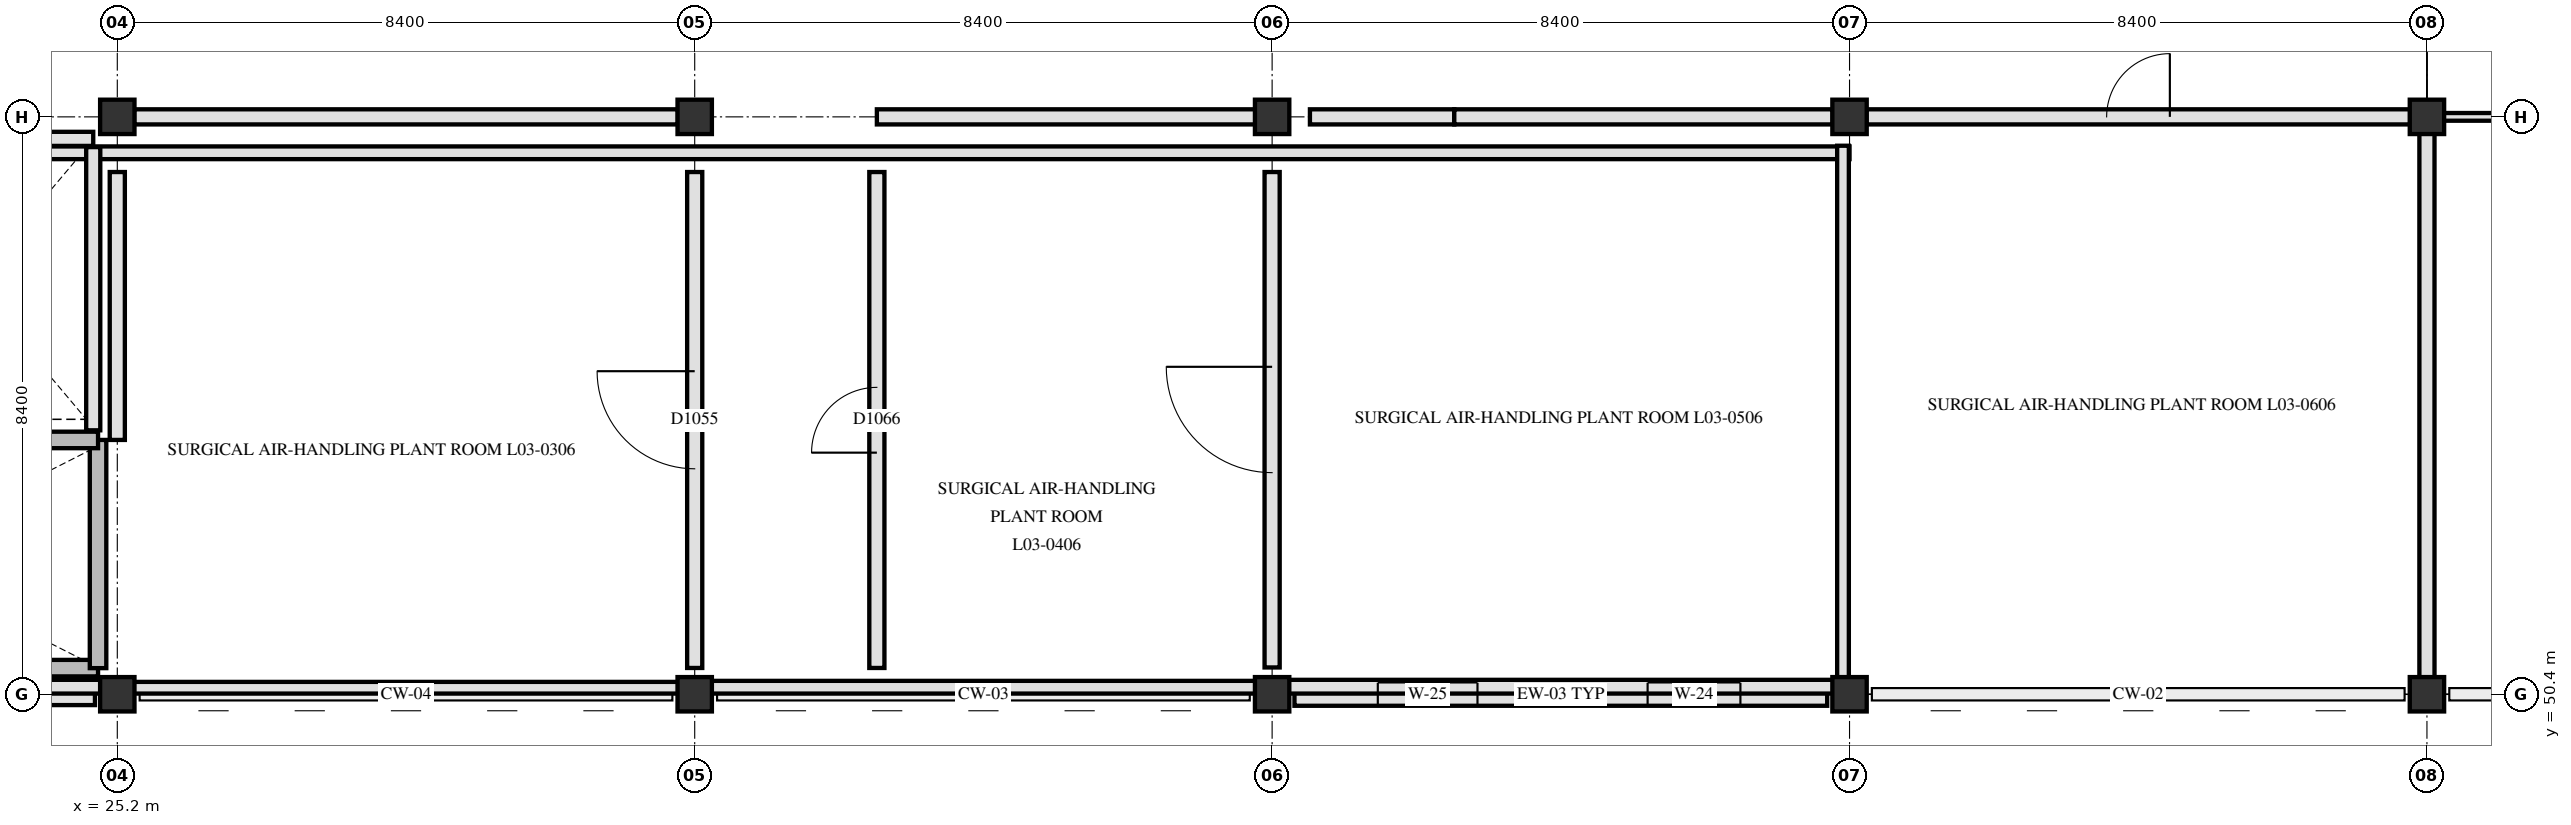
"""IFC4 building model, lengths in metres.
Left out: names, types, materials, properties, quantities, classifications, styles, units other than length and angle.
Written with IfcOpenShell. Run it as: python <this file> out.ifc"""

import sys

from ifc_helpers import new_model, si_unit, direction, frame, frame_2d, origin, origin_2d, place, context, subcontext, project, spatial, rectangle, extrude, element, fill, save


model = new_model("IFC4")
c1 = context("Model", 3, precision=1e-05, world=origin(), true_north=direction((0.0, 1.0)))
c2 = subcontext(c1, "Body", "Model", "MODEL_VIEW")
j1 = project(units=[si_unit("LENGTHUNIT", "METRE"), si_unit("PLANEANGLEUNIT", "RADIAN")], contexts=[c1])
p1 = place(None, origin())
s1 = spatial("IfcSite", under=j1, at=p1, CompositionType="ELEMENT")
p2 = place(p1, origin())
s2 = spatial("IfcBuilding", under=s1, at=p2, CompositionType="ELEMENT")
p3 = place(p2, frame((0.0, 0.0, 14.4)))
s3 = spatial("IfcBuildingStorey", under=s2, at=p3, CompositionType="ELEMENT", Elevation=14.4)
for number, where, z_axis, x_axis in (
    (1, (25.2, 50.4, 0.0), (0.0, 0.0, 1.0), (1.0, 0.0, 0.0)),
    (2, (25.2, 58.8, 0.0), (0.0, 0.0, 1.0), (1.0, 0.0, 0.0)),
    (3, (33.6, 50.4, 0.0), (0.0, 0.0, 1.0), (1.0, 0.0, 0.0)),
    (4, (33.6, 58.8, 0.0), (0.0, 0.0, 1.0), (1.0, 0.0, 0.0)),
    (5, (42.0, 50.4, 0.0), (0.0, 0.0, 1.0), (1.0, 0.0, 0.0)),
    (6, (42.0, 58.8, 0.0), (0.0, 0.0, 1.0), (1.0, 0.0, 0.0)),
    (7, (50.4, 50.4, 0.0), (0.0, 0.0, 1.0), (1.0, 0.0, 0.0)),
    (8, (50.4, 58.8, 0.0), (0.0, 0.0, 1.0), (1.0, 0.0, 0.0)),
    (9, (58.8, 50.4, 0.0), (0.0, 0.0, 1.0), (1.0, 0.0, 0.0)),
    (10, (58.8, 58.8, 0.0), (0.0, 0.0, 1.0), (1.0, 0.0, 0.0)),
):
    element("IfcColumn", number, at=place(p3, frame(where, z_axis=z_axis, x_axis=x_axis)), inside=s3, PredefinedType="COLUMN", context=c2, shape_type="SweptSolid", body=[
        extrude(rectangle(XDim=0.5, YDim=0.5, at=origin_2d()), origin(), (0.0, 0.0, 1.0), 4.2),
    ])
p4 = place(p3, frame((50.075, 50.4, 0.0), z_axis=(0.0, 0.0, 1.0), x_axis=(-1.0, 0.0, 0.0)))
e11 = element("IfcWall", 11, at=p4, inside=s3, PredefinedType="SOLIDWALL", context=c2, shape_type="SweptSolid", body=[
    extrude(rectangle(XDim=7.75, YDim=0.335, at=frame_2d((3.875, 0.0))), origin(), (0.0, 0.0, 1.0), 3.19),
])
p5 = place(p4, frame((1.262, 0.0, 0.85)))
e12 = element("IfcOpeningElement", 12, at=p5, cuts=e11, PredefinedType="OPENING", context=c2, shape_type="SweptSolid", body=[
    extrude(rectangle(XDim=1.35, YDim=1.54, at=frame_2d((0.675, 0.77))), frame((0.0, 0.177, 0.0), z_axis=(0.0, -1.0, 0.0), x_axis=(1.0, 0.0, 0.0)), (0.0, 0.0, 1.0), 0.355),
])
p6 = place(p4, frame((5.087, 0.0, 0.85)))
e13 = element("IfcOpeningElement", 13, at=p6, cuts=e11, PredefinedType="OPENING", context=c2, shape_type="SweptSolid", body=[
    extrude(rectangle(XDim=1.45, YDim=1.54, at=frame_2d((0.725, 0.77))), frame((0.0, 0.177, 0.0), z_axis=(0.0, -1.0, 0.0), x_axis=(1.0, 0.0, 0.0)), (0.0, 0.0, 1.0), 0.355),
])
p7 = place(p3, frame((24.875, 50.4, 0.0), z_axis=(0.0, 0.0, 1.0), x_axis=(-1.0, 0.0, 0.0)))
e14 = element("IfcWall", 14, at=p7, inside=s3, PredefinedType="SOLIDWALL", context=c2, shape_type="SweptSolid", body=[
    extrude(rectangle(XDim=7.75, YDim=0.315, at=frame_2d((3.875, 0.0))), origin(), (0.0, 0.0, 1.0), 3.19),
])
p8 = place(p7, frame((1.163, 0.0, 0.85)))
e15 = element("IfcOpeningElement", 15, at=p8, cuts=e14, PredefinedType="OPENING", context=c2, shape_type="SweptSolid", body=[
    extrude(rectangle(XDim=1.55, YDim=1.54, at=frame_2d((0.775, 0.77))), frame((0.0, 0.167, 0.0), z_axis=(0.0, -1.0, 0.0), x_axis=(1.0, 0.0, 0.0)), (0.0, 0.0, 1.0), 0.335),
])
p9 = place(p7, frame((4.988, 0.0, 0.85)))
e16 = element("IfcOpeningElement", 16, at=p9, cuts=e14, PredefinedType="OPENING", context=c2, shape_type="SweptSolid", body=[
    extrude(rectangle(XDim=1.65, YDim=1.54, at=frame_2d((0.825, 0.77))), frame((0.0, 0.167, 0.0), z_axis=(0.0, -1.0, 0.0), x_axis=(1.0, 0.0, 0.0)), (0.0, 0.0, 1.0), 0.335),
])
p10 = place(p3, frame((8.4, 58.278, 4.18), z_axis=(0.0, 0.0, 1.0), x_axis=(1.0, 0.0, 0.0)))
e17 = element("IfcWall", 17, at=p10, inside=s3, PredefinedType="PARAPET", context=c2, shape_type="SweptSolid", body=[
    extrude(rectangle(XDim=42.0, YDim=0.185, at=frame_2d((21.0, 0.0))), origin(), (0.0, 0.0, 1.0), 1.17),
])
p11 = place(p3, frame((50.305, 58.38, 4.18), z_axis=(0.0, 0.0, 1.0), x_axis=(0.0, -1.0, 0.0)))
e18 = element("IfcWall", 18, at=p11, inside=s3, PredefinedType="PARAPET", context=c2, shape_type="SweptSolid", body=[
    extrude(rectangle(XDim=7.98, YDim=0.17, at=frame_2d((3.99, 0.0))), origin(), (0.0, 0.0, 1.0), 1.17),
])
p12 = place(p3, frame((50.4, 50.51, 4.18), z_axis=(0.0, 0.0, 1.0), x_axis=(-1.0, 0.0, 0.0)))
e19 = element("IfcWall", 19, at=p12, inside=s3, PredefinedType="PARAPET", context=c2, shape_type="SweptSolid", body=[
    extrude(rectangle(XDim=8.4, YDim=0.2, at=frame_2d((4.2, 0.0))), origin(), (0.0, 0.0, 1.0), 1.17),
])
p13 = place(p3, frame((42.0, 50.502, 4.18), z_axis=(0.0, 0.0, 1.0), x_axis=(-1.0, 0.0, 0.0)))
e20 = element("IfcWall", 20, at=p13, inside=s3, PredefinedType="PARAPET", context=c2, shape_type="SweptSolid", body=[
    extrude(rectangle(XDim=8.4, YDim=0.185, at=frame_2d((4.2, 0.0))), origin(), (0.0, 0.0, 1.0), 1.17),
])
p14 = place(p3, frame((33.6, 50.495, 4.18), z_axis=(0.0, 0.0, 1.0), x_axis=(-1.0, 0.0, 0.0)))
e21 = element("IfcWall", 21, at=p14, inside=s3, PredefinedType="PARAPET", context=c2, shape_type="SweptSolid", body=[
    extrude(rectangle(XDim=8.4, YDim=0.17, at=frame_2d((4.2, 0.0))), origin(), (0.0, 0.0, 1.0), 1.17),
])
p15 = place(p3, frame((25.2, 50.51, 4.18), z_axis=(0.0, 0.0, 1.0), x_axis=(-1.0, 0.0, 0.0)))
e22 = element("IfcWall", 22, at=p15, inside=s3, PredefinedType="PARAPET", context=c2, shape_type="SweptSolid", body=[
    extrude(rectangle(XDim=8.4, YDim=0.2, at=frame_2d((4.2, 0.0))), origin(), (0.0, 0.0, 1.0), 1.17),
])
p16 = place(p3, frame((17.1, 50.78, 0.0), z_axis=(0.0, 0.0, 1.0), x_axis=(1.0, 0.0, 0.0)))
e23 = element("IfcWall", 23, at=p16, inside=s3, PredefinedType="SHEAR", context=c2, shape_type="SweptSolid", body=[
    extrude(rectangle(XDim=7.82, YDim=0.24, at=frame_2d((3.91, 0.0))), origin(), (0.0, 0.0, 1.0), 3.9),
])
p17 = place(p3, frame((24.92, 50.78, 0.0), z_axis=(0.0, 0.0, 1.0), x_axis=(0.0, 1.0, 0.0)))
e24 = element("IfcWall", 24, at=p17, inside=s3, PredefinedType="SHEAR", context=c2, shape_type="SweptSolid", body=[
    extrude(rectangle(XDim=3.32, YDim=0.24, at=frame_2d((1.66, 0.0))), origin(), (0.0, 0.0, 1.0), 3.9),
])
p18 = place(p3, frame((17.1, 54.1, 0.0), z_axis=(0.0, 0.0, 1.0), x_axis=(1.0, 0.0, 0.0)))
e25 = element("IfcWall", 25, at=p18, inside=s3, PredefinedType="SHEAR", context=c2, shape_type="SweptSolid", body=[
    extrude(rectangle(XDim=7.82, YDim=0.24, at=frame_2d((3.91, 0.0))), origin(), (0.0, 0.0, 1.0), 3.9),
])
p19 = place(p18, frame((0.25, 0.0, 0.0)))
e26 = element("IfcOpeningElement", 26, at=p19, cuts=e25, PredefinedType="OPENING", context=c2, shape_type="SweptSolid", body=[
    extrude(rectangle(XDim=1.45, YDim=2.2, at=frame_2d((0.725, 1.1))), frame((0.0, 0.13, 0.0), z_axis=(0.0, -1.0, 0.0), x_axis=(1.0, 0.0, 0.0)), (0.0, 0.0, 1.0), 0.26),
])
p20 = place(p3, frame((24.85, 54.24, 0.0), z_axis=(0.0, 0.0, 1.0), x_axis=(0.0, 1.0, 0.0)))
e27 = element("IfcWall", 27, at=p20, inside=s3, PredefinedType="PARTITIONING", context=c2, shape_type="SweptSolid", body=[
    extrude(rectangle(XDim=4.12, YDim=0.205, at=frame_2d((2.06, 0.0))), origin(), (0.0, 0.0, 1.0), 3.89),
])
p21 = place(p3, frame((21.28, 58.48, 0.0), z_axis=(0.0, 0.0, 1.0), x_axis=(1.0, 0.0, 0.0)))
e28 = element("IfcWall", 28, at=p21, inside=s3, PredefinedType="PARTITIONING", context=c2, shape_type="SweptSolid", body=[
    extrude(rectangle(XDim=3.57, YDim=0.205, at=frame_2d((1.785, 0.0))), origin(), (0.0, 0.0, 1.0), 3.28),
])
p22 = place(p3, frame((25.445, 58.8, 0.0), z_axis=(0.0, 0.0, 1.0), x_axis=(1.0, 0.0, 0.0)))
e29 = element("IfcWall", 29, at=p22, inside=s3, PredefinedType="PARTITIONING", context=c2, shape_type="SweptSolid", body=[
    extrude(rectangle(XDim=7.91, YDim=0.22, at=frame_2d((3.955, 0.0))), origin(), (0.0, 0.0, 1.0), 3.28),
])
p23 = place(p3, frame((36.25, 58.8, 0.0), z_axis=(0.0, 0.0, 1.0), x_axis=(1.0, 0.0, 0.0)))
e30 = element("IfcWall", 30, at=p23, inside=s3, PredefinedType="PARTITIONING", context=c2, shape_type="SweptSolid", body=[
    extrude(rectangle(XDim=5.505, YDim=0.22, at=frame_2d((2.752, 0.0))), origin(), (0.0, 0.0, 1.0), 3.28),
])
p24 = place(p3, frame((42.55, 58.8, 0.0), z_axis=(0.0, 0.0, 1.0), x_axis=(1.0, 0.0, 0.0)))
e31 = element("IfcWall", 31, at=p24, inside=s3, PredefinedType="PARTITIONING", context=c2, shape_type="SweptSolid", body=[
    extrude(rectangle(XDim=2.1, YDim=0.22, at=frame_2d((1.05, 0.0))), origin(), (0.0, 0.0, 1.0), 3.28),
])
p25 = place(p3, frame((44.65, 58.8, 0.0), z_axis=(0.0, 0.0, 1.0), x_axis=(1.0, 0.0, 0.0)))
e32 = element("IfcWall", 32, at=p25, inside=s3, PredefinedType="PARTITIONING", context=c2, shape_type="SweptSolid", body=[
    extrude(rectangle(XDim=5.505, YDim=0.22, at=frame_2d((2.752, 0.0))), origin(), (0.0, 0.0, 1.0), 3.28),
])
p26 = place(p3, frame((50.645, 58.8, 0.0), z_axis=(0.0, 0.0, 1.0), x_axis=(1.0, 0.0, 0.0)))
e33 = element("IfcWall", 33, at=p26, inside=s3, PredefinedType="PARTITIONING", context=c2, shape_type="SweptSolid", body=[
    extrude(rectangle(XDim=7.91, YDim=0.22, at=frame_2d((3.955, 0.0))), origin(), (0.0, 0.0, 1.0), 3.28),
])
p27 = place(p26, frame((3.495, 0.0, 0.0)))
e34 = element("IfcOpeningElement", 34, at=p27, cuts=e33, PredefinedType="OPENING", context=c2, shape_type="SweptSolid", body=[
    extrude(rectangle(XDim=0.92, YDim=2.08, at=frame_2d((0.46, 1.04))), frame((0.0, 0.12, 0.0), z_axis=(0.0, -1.0, 0.0), x_axis=(1.0, 0.0, 0.0)), (0.0, 0.0, 1.0), 0.24),
])
p28 = place(p3, frame((59.045, 58.8, 0.0), z_axis=(0.0, 0.0, 1.0), x_axis=(1.0, 0.0, 0.0)))
e35 = element("IfcWall", 35, at=p28, inside=s3, PredefinedType="PARTITIONING", context=c2, shape_type="SweptSolid", body=[
    extrude(rectangle(XDim=7.91, YDim=0.112, at=frame_2d((3.955, 0.0))), origin(), (0.0, 0.0, 1.0), 3.28),
])
p29 = place(p28, frame((3.28, 0.0, 0.0)))
e36 = element("IfcOpeningElement", 36, at=p29, cuts=e35, PredefinedType="OPENING", context=c2, shape_type="SweptSolid", body=[
    extrude(rectangle(XDim=1.35, YDim=2.2, at=frame_2d((0.675, 1.1))), frame((0.0, 0.066, 0.0), z_axis=(0.0, -1.0, 0.0), x_axis=(1.0, 0.0, 0.0)), (0.0, 0.0, 1.0), 0.132),
])
p30 = place(p3, frame((25.2, 54.1, 0.0), z_axis=(0.0, 0.0, 1.0), x_axis=(0.0, 1.0, 0.0)))
e37 = element("IfcWall", 37, at=p30, inside=s3, PredefinedType="PARTITIONING", context=c2, shape_type="SweptSolid", body=[
    extrude(rectangle(XDim=3.897, YDim=0.22, at=frame_2d((1.949, 0.0))), origin(), (0.0, 0.0, 1.0), 3.34),
])
p31 = place(p3, frame((33.6, 50.782, 0.0), z_axis=(0.0, 0.0, 1.0), x_axis=(0.0, 1.0, 0.0)))
e38 = element("IfcWall", 38, at=p31, inside=s3, PredefinedType="PARTITIONING", context=c2, shape_type="SweptSolid", body=[
    extrude(rectangle(XDim=7.215, YDim=0.22, at=frame_2d((3.607, 0.0))), origin(), (0.0, 0.0, 1.0), 3.34),
])
p32 = place(p31, frame((2.897, 0.0, 0.0)))
e39 = element("IfcOpeningElement", 39, at=p32, cuts=e38, PredefinedType="OPENING", context=c2, shape_type="SweptSolid", body=[
    extrude(rectangle(XDim=1.42, YDim=2.22, at=frame_2d((0.71, 1.11))), frame((0.0, 0.12, 0.0), z_axis=(0.0, -1.0, 0.0), x_axis=(1.0, 0.0, 0.0)), (0.0, 0.0, 1.0), 0.24),
])
p33 = place(p3, frame((36.25, 50.782, 0.0), z_axis=(0.0, 0.0, 1.0), x_axis=(0.0, 1.0, 0.0)))
e40 = element("IfcWall", 40, at=p33, inside=s3, PredefinedType="PARTITIONING", context=c2, shape_type="SweptSolid", body=[
    extrude(rectangle(XDim=7.215, YDim=0.22, at=frame_2d((3.607, 0.0))), origin(), (0.0, 0.0, 1.0), 3.89),
])
p34 = place(p33, frame((3.133, 0.0, 0.0)))
e41 = element("IfcOpeningElement", 41, at=p34, cuts=e40, PredefinedType="OPENING", context=c2, shape_type="SweptSolid", body=[
    extrude(rectangle(XDim=0.95, YDim=2.1, at=frame_2d((0.475, 1.05))), frame((0.0, 0.12, 0.0), z_axis=(0.0, -1.0, 0.0), x_axis=(1.0, 0.0, 0.0)), (0.0, 0.0, 1.0), 0.24),
])
p35 = place(p3, frame((42.0, 50.79, 0.0), z_axis=(0.0, 0.0, 1.0), x_axis=(0.0, 1.0, 0.0)))
e42 = element("IfcWall", 42, at=p35, inside=s3, PredefinedType="PARTITIONING", context=c2, shape_type="SweptSolid", body=[
    extrude(rectangle(XDim=7.208, YDim=0.22, at=frame_2d((3.604, 0.0))), origin(), (0.0, 0.0, 1.0), 3.34),
])
p36 = place(p35, frame((2.834, 0.0, 0.0)))
e43 = element("IfcOpeningElement", 43, at=p36, cuts=e42, PredefinedType="OPENING", context=c2, shape_type="SweptSolid", body=[
    extrude(rectangle(XDim=1.54, YDim=2.24, at=frame_2d((0.77, 1.12))), frame((0.0, 0.12, 0.0), z_axis=(0.0, -1.0, 0.0), x_axis=(1.0, 0.0, 0.0)), (0.0, 0.0, 1.0), 0.24),
])
p37 = place(p3, frame((58.8, 50.645, 0.0), z_axis=(0.0, 0.0, 1.0), x_axis=(0.0, 1.0, 0.0)))
e44 = element("IfcWall", 44, at=p37, inside=s3, PredefinedType="PARTITIONING", context=c2, shape_type="SweptSolid", body=[
    extrude(rectangle(XDim=7.91, YDim=0.22, at=frame_2d((3.955, 0.0))), origin(), (0.0, 0.0, 1.0), 3.34),
])
p38 = place(p5, origin())
e45 = element("IfcWindow", 45, at=p38, inside=s3, PartitioningType="SINGLE_PANEL", PredefinedType="WINDOW", context=c2, shape_type="SweptSolid", body=[
    extrude(rectangle(XDim=1.35, YDim=1.54, at=frame_2d((0.675, 0.77))), frame((0.0, 0.03, 0.0), z_axis=(0.0, -1.0, 0.0), x_axis=(1.0, 0.0, 0.0)), (0.0, 0.0, 1.0), 0.06),
])
fill(e12, e45)
p39 = place(p6, origin())
e46 = element("IfcWindow", 46, at=p39, inside=s3, PartitioningType="SINGLE_PANEL", PredefinedType="WINDOW", context=c2, shape_type="SweptSolid", body=[
    extrude(rectangle(XDim=1.45, YDim=1.54, at=frame_2d((0.725, 0.77))), frame((0.0, 0.03, 0.0), z_axis=(0.0, -1.0, 0.0), x_axis=(1.0, 0.0, 0.0)), (0.0, 0.0, 1.0), 0.06),
])
fill(e13, e46)
p40 = place(p32, origin())
e47 = element("IfcDoor", 47, at=p40, inside=s3, OperationType="SINGLE_SWING_RIGHT", PredefinedType="DOOR", context=c2, shape_type="SweptSolid", body=[
    extrude(rectangle(XDim=1.42, YDim=2.22, at=frame_2d((0.71, 1.11))), frame((0.0, 0.025, 0.0), z_axis=(0.0, -1.0, 0.0), x_axis=(1.0, 0.0, 0.0)), (0.0, 0.0, 1.0), 0.05),
])
fill(e39, e47)
p41 = place(p34, origin())
e48 = element("IfcDoor", 48, at=p41, inside=s3, OperationType="SINGLE_SWING_LEFT", PredefinedType="DOOR", context=c2, shape_type="SweptSolid", body=[
    extrude(rectangle(XDim=0.95, YDim=2.1, at=frame_2d((0.475, 1.05))), frame((0.0, 0.025, 0.0), z_axis=(0.0, -1.0, 0.0), x_axis=(1.0, 0.0, 0.0)), (0.0, 0.0, 1.0), 0.05),
])
fill(e41, e48)
p42 = place(p36, origin())
e49 = element("IfcDoor", 49, at=p42, inside=s3, OperationType="SINGLE_SWING_RIGHT", PredefinedType="DOOR", context=c2, shape_type="SweptSolid", body=[
    extrude(rectangle(XDim=1.54, YDim=2.24, at=frame_2d((0.77, 1.12))), frame((0.0, 0.025, 0.0), z_axis=(0.0, -1.0, 0.0), x_axis=(1.0, 0.0, 0.0)), (0.0, 0.0, 1.0), 0.05),
])
fill(e43, e49)
p43 = place(p27, origin())
e50 = element("IfcDoor", 50, at=p43, inside=s3, OperationType="SINGLE_SWING_RIGHT", PredefinedType="DOOR", context=c2, shape_type="SweptSolid", body=[
    extrude(rectangle(XDim=0.92, YDim=2.08, at=frame_2d((0.46, 1.04))), frame((0.0, 0.025, 0.0), z_axis=(0.0, -1.0, 0.0), x_axis=(1.0, 0.0, 0.0)), (0.0, 0.0, 1.0), 0.05),
])
fill(e34, e50)
save(model, sys.argv[1])
